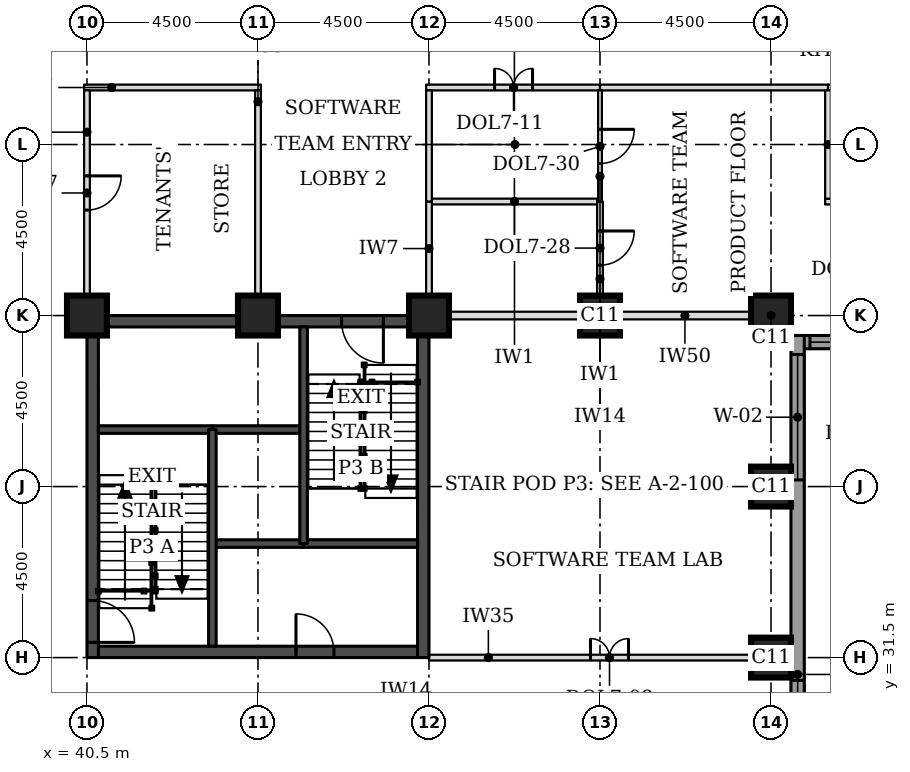
"""IFC4 building model, lengths in metres.
Left out: names, types, materials, properties, quantities, classifications, styles, units other than length and angle.
Written with IfcOpenShell. Run it as: python <this file> out.ifc"""

import sys

from ifc_helpers import new_model, si_unit, direction, frame, frame_2d, origin, origin_2d, place, context, subcontext, project, spatial, rectangle, extrude, element, fill, save


model = new_model("IFC4")
c1 = context("Model", 3, precision=1e-05, world=origin(), true_north=direction((0.0, 1.0)))
c2 = subcontext(c1, "Body", "Model", "MODEL_VIEW")
j1 = project(units=[si_unit("LENGTHUNIT", "METRE"), si_unit("PLANEANGLEUNIT", "RADIAN")], contexts=[c1])
p1 = place(None, origin())
s1 = spatial("IfcSite", under=j1, at=p1, CompositionType="ELEMENT")
p2 = place(p1, origin())
s2 = spatial("IfcBuilding", under=s1, at=p2, CompositionType="ELEMENT")
p3 = place(p2, frame((0.0, 0.0, 134.4)))
s3 = spatial("IfcBuildingStorey", under=s2, at=p3, CompositionType="ELEMENT", Elevation=134.4)
for number, where, z_axis, x_axis in (
    (1, (58.5, 31.5, 0.0), (0.0, 0.0, 1.0), (1.0, 0.0, 0.0)),
    (2, (58.5, 36.0, 0.0), (0.0, 0.0, 1.0), (1.0, 0.0, 0.0)),
    (3, (40.5, 40.5, 0.0), (0.0, 0.0, 1.0), (1.0, 0.0, 0.0)),
    (4, (45.0, 40.5, 0.0), (0.0, 0.0, 1.0), (1.0, 0.0, 0.0)),
    (5, (49.5, 40.5, 0.0), (0.0, 0.0, 1.0), (1.0, 0.0, 0.0)),
    (6, (54.0, 40.5, 0.0), (0.0, 0.0, 1.0), (1.0, 0.0, 0.0)),
    (7, (58.5, 40.5, 0.0), (0.0, 0.0, 1.0), (1.0, 0.0, 0.0)),
):
    element("IfcColumn", number, at=place(p3, frame(where, z_axis=z_axis, x_axis=x_axis)), inside=s3, PredefinedType="COLUMN", context=c2, shape_type="SweptSolid", body=[
        extrude(rectangle(XDim=1.05, YDim=1.05, at=origin_2d()), origin(), (0.0, 0.0, 1.0), 3.7),
    ])
p4 = place(p3, frame((40.8, 31.65, 0.0), z_axis=(0.0, 0.0, 1.0), x_axis=(1.0, 0.0, 0.0)))
e8 = element("IfcWall", 8, at=p4, inside=s3, PredefinedType="SHEAR", context=c2, shape_type="SweptSolid", body=[
    extrude(rectangle(XDim=8.4, YDim=0.3, at=frame_2d((4.2, 0.0))), origin(), (0.0, 0.0, 1.0), 3.7),
])
p5 = place(p4, frame((5.2, 0.0, 0.0)))
e9 = element("IfcOpeningElement", 9, at=p5, cuts=e8, PredefinedType="OPENING", context=c2, shape_type="SweptSolid", body=[
    extrude(rectangle(XDim=1.0, YDim=2.1, at=frame_2d((0.5, 1.05))), frame((0.0, 0.16, 0.0), z_axis=(0.0, -1.0, 0.0), x_axis=(1.0, 0.0, 0.0)), (0.0, 0.0, 1.0), 0.32),
])
p6 = place(p3, frame((40.8, 40.35, 0.0), z_axis=(0.0, 0.0, 1.0), x_axis=(1.0, 0.0, 0.0)))
e10 = element("IfcWall", 10, at=p6, inside=s3, PredefinedType="SHEAR", context=c2, shape_type="SweptSolid", body=[
    extrude(rectangle(XDim=8.4, YDim=0.3, at=frame_2d((4.2, 0.0))), origin(), (0.0, 0.0, 1.0), 3.7),
])
p7 = place(p6, frame((6.4, 0.0, 0.0)))
e11 = element("IfcOpeningElement", 11, at=p7, cuts=e10, PredefinedType="OPENING", context=c2, shape_type="SweptSolid", body=[
    extrude(rectangle(XDim=1.1, YDim=2.1, at=frame_2d((0.55, 1.05))), frame((0.0, 0.16, 0.0), z_axis=(0.0, -1.0, 0.0), x_axis=(1.0, 0.0, 0.0)), (0.0, 0.0, 1.0), 0.32),
])
p8 = place(p3, frame((40.65, 31.5, 0.0), z_axis=(0.0, 0.0, 1.0), x_axis=(0.0, 1.0, 0.0)))
e12 = element("IfcWall", 12, at=p8, inside=s3, PredefinedType="SHEAR", context=c2, shape_type="SweptSolid", body=[
    extrude(rectangle(XDim=9.0, YDim=0.3, at=frame_2d((4.5, 0.0))), origin(), (0.0, 0.0, 1.0), 3.7),
])
p9 = place(p8, frame((0.4, 0.0, 0.0)))
e13 = element("IfcOpeningElement", 13, at=p9, cuts=e12, PredefinedType="OPENING", context=c2, shape_type="SweptSolid", body=[
    extrude(rectangle(XDim=1.1, YDim=2.1, at=frame_2d((0.55, 1.05))), frame((0.0, 0.16, 0.0), z_axis=(0.0, -1.0, 0.0), x_axis=(1.0, 0.0, 0.0)), (0.0, 0.0, 1.0), 0.32),
])
p10 = place(p3, frame((49.35, 31.5, 0.0), z_axis=(0.0, 0.0, 1.0), x_axis=(0.0, 1.0, 0.0)))
e14 = element("IfcWall", 14, at=p10, inside=s3, PredefinedType="SHEAR", context=c2, shape_type="SweptSolid", body=[
    extrude(rectangle(XDim=9.0, YDim=0.3, at=frame_2d((4.5, 0.0))), origin(), (0.0, 0.0, 1.0), 3.7),
])
p11 = place(p3, frame((59.025, 39.8, 0.0), z_axis=(0.0, 0.0, 1.0), x_axis=(1.0, 0.0, 0.0)))
e15 = element("IfcWall", 15, at=p11, inside=s3, PredefinedType="STANDARD", context=c2, shape_type="SweptSolid", body=[
    extrude(rectangle(XDim=13.337, YDim=0.35, at=frame_2d((6.669, 0.0))), origin(), (0.0, 0.0, 1.0), 3.525),
])
p12 = place(p11, frame((0.5, 0.0, 0.9)))
e16 = element("IfcOpeningElement", 16, at=p12, cuts=e15, PredefinedType="OPENING", context=c2, shape_type="SweptSolid", body=[
    extrude(rectangle(XDim=3.3, YDim=1.9, at=frame_2d((1.65, 0.95))), frame((0.0, 0.185, 0.0), z_axis=(0.0, -1.0, 0.0), x_axis=(1.0, 0.0, 0.0)), (0.0, 0.0, 1.0), 0.37),
])
p13 = place(p3, frame((59.2, 22.138, 0.0), z_axis=(0.0, 0.0, 1.0), x_axis=(0.0, 1.0, 0.0)))
e17 = element("IfcWall", 17, at=p13, inside=s3, PredefinedType="STANDARD", context=c2, shape_type="SweptSolid", body=[
    extrude(rectangle(XDim=17.837, YDim=0.35, at=frame_2d((8.919, 0.0))), origin(), (0.0, 0.0, 1.0), 3.525),
])
p14 = place(p13, frame((5.462, 0.0, 0.9)))
e18 = element("IfcOpeningElement", 18, at=p14, cuts=e17, PredefinedType="OPENING", context=c2, shape_type="SweptSolid", body=[
    extrude(rectangle(XDim=3.3, YDim=1.9, at=frame_2d((1.65, 0.95))), frame((0.0, 0.185, 0.0), z_axis=(0.0, -1.0, 0.0), x_axis=(1.0, 0.0, 0.0)), (0.0, 0.0, 1.0), 0.37),
])
p15 = place(p13, frame((14.037, 0.0, 0.9)))
e19 = element("IfcOpeningElement", 19, at=p15, cuts=e17, PredefinedType="OPENING", context=c2, shape_type="SweptSolid", body=[
    extrude(rectangle(XDim=3.3, YDim=1.9, at=frame_2d((1.65, 0.95))), frame((0.0, 0.185, 0.0), z_axis=(0.0, -1.0, 0.0), x_axis=(1.0, 0.0, 0.0)), (0.0, 0.0, 1.0), 0.37),
])
p16 = place(p3, frame((49.5, 31.5, 0.0), z_axis=(0.0, 0.0, 1.0), x_axis=(1.0, 0.0, 0.0)))
e20 = element("IfcWall", 20, at=p16, inside=s3, PredefinedType="PARTITIONING", context=c2, shape_type="SweptSolid", body=[
    extrude(rectangle(XDim=9.525, YDim=0.15, at=frame_2d((4.762, 0.0))), origin(), (0.0, 0.0, 1.0), 2.55),
])
p17 = place(p16, frame((4.25, 0.0, 0.0)))
e21 = element("IfcOpeningElement", 21, at=p17, cuts=e20, PredefinedType="OPENING", context=c2, shape_type="SweptSolid", body=[
    extrude(rectangle(XDim=1.0, YDim=2.1, at=frame_2d((0.5, 1.05))), frame((0.0, 0.085, 0.0), z_axis=(0.0, -1.0, 0.0), x_axis=(1.0, 0.0, 0.0)), (0.0, 0.0, 1.0), 0.17),
])
p18 = place(p3, frame((50.015, 40.5, 0.0), z_axis=(0.0, 0.0, 1.0), x_axis=(1.0, 0.0, 0.0)))
e22 = element("IfcWall", 22, at=p18, inside=s3, PredefinedType="PARTITIONING", context=c2, shape_type="SweptSolid", body=[
    extrude(rectangle(XDim=3.46, YDim=0.2, at=frame_2d((1.73, 0.0))), origin(), (0.0, 0.0, 1.0), 2.8),
])
p19 = place(p3, frame((54.495, 40.5, 0.0), z_axis=(0.0, 0.0, 1.0), x_axis=(1.0, 0.0, 0.0)))
e23 = element("IfcWall", 23, at=p19, inside=s3, PredefinedType="PARTITIONING", context=c2, shape_type="SweptSolid", body=[
    extrude(rectangle(XDim=3.48, YDim=0.2, at=frame_2d((1.74, 0.0))), origin(), (0.0, 0.0, 1.0), 2.8),
])
p20 = place(p3, frame((49.575, 43.5, 0.0), z_axis=(0.0, 0.0, 1.0), x_axis=(1.0, 0.0, 0.0)))
e24 = element("IfcWall", 24, at=p20, inside=s3, PredefinedType="PARTITIONING", context=c2, shape_type="SweptSolid", body=[
    extrude(rectangle(XDim=4.35, YDim=0.15, at=frame_2d((2.175, 0.0))), origin(), (0.0, 0.0, 1.0), 3.55),
])
p21 = place(p3, frame((59.925, 43.5, 0.0), z_axis=(0.0, 0.0, 1.0), x_axis=(1.0, 0.0, 0.0)))
e25 = element("IfcWall", 25, at=p21, inside=s3, PredefinedType="PARTITIONING", context=c2, shape_type="SweptSolid", body=[
    extrude(rectangle(XDim=2.975, YDim=0.15, at=frame_2d((1.487, 0.0))), origin(), (0.0, 0.0, 1.0), 3.55),
])
p22 = place(p21, frame((1.05, 0.0, 0.0)))
e26 = element("IfcOpeningElement", 26, at=p22, cuts=e25, PredefinedType="OPENING", context=c2, shape_type="SweptSolid", body=[
    extrude(rectangle(XDim=0.9, YDim=2.1, at=frame_2d((0.45, 1.05))), frame((0.0, 0.085, 0.0), z_axis=(0.0, -1.0, 0.0), x_axis=(1.0, 0.0, 0.0)), (0.0, 0.0, 1.0), 0.17),
])
p23 = place(p3, frame((40.425, 46.5, 0.0), z_axis=(0.0, 0.0, 1.0), x_axis=(1.0, 0.0, 0.0)))
e27 = element("IfcWall", 27, at=p23, inside=s3, PredefinedType="PARTITIONING", context=c2, shape_type="SweptSolid", body=[
    extrude(rectangle(XDim=4.65, YDim=0.15, at=frame_2d((2.325, 0.0))), origin(), (0.0, 0.0, 1.0), 3.55),
])
p24 = place(p3, frame((49.425, 46.5, 0.0), z_axis=(0.0, 0.0, 1.0), x_axis=(1.0, 0.0, 0.0)))
e28 = element("IfcWall", 28, at=p24, inside=s3, PredefinedType="PARTITIONING", context=c2, shape_type="SweptSolid", body=[
    extrude(rectangle(XDim=4.575, YDim=0.15, at=frame_2d((2.288, 0.0))), origin(), (0.0, 0.0, 1.0), 3.55),
])
p25 = place(p24, frame((1.8, 0.0, 0.0)))
e29 = element("IfcOpeningElement", 29, at=p25, cuts=e28, PredefinedType="OPENING", context=c2, shape_type="SweptSolid", body=[
    extrude(rectangle(XDim=1.0, YDim=2.1, at=frame_2d((0.5, 1.05))), frame((0.0, 0.085, 0.0), z_axis=(0.0, -1.0, 0.0), x_axis=(1.0, 0.0, 0.0)), (0.0, 0.0, 1.0), 0.17),
])
p26 = place(p3, frame((54.0, 46.5, 0.0), z_axis=(0.0, 0.0, 1.0), x_axis=(1.0, 0.0, 0.0)))
e30 = element("IfcWall", 30, at=p26, inside=s3, PredefinedType="PARTITIONING", context=c2, shape_type="SweptSolid", body=[
    extrude(rectangle(XDim=6.0, YDim=0.15, at=frame_2d((3.0, 0.0))), origin(), (0.0, 0.0, 1.0), 3.55),
])
p27 = place(p3, frame((60.0, 46.5, 0.0), z_axis=(0.0, 0.0, 1.0), x_axis=(1.0, 0.0, 0.0)))
e31 = element("IfcWall", 31, at=p27, inside=s3, PredefinedType="PARTITIONING", context=c2, shape_type="SweptSolid", body=[
    extrude(rectangle(XDim=3.0, YDim=0.15, at=frame_2d((1.5, 0.0))), origin(), (0.0, 0.0, 1.0), 3.55),
])
p28 = place(p3, frame((40.5, 41.025, 0.0), z_axis=(0.0, 0.0, 1.0), x_axis=(0.0, 1.0, 0.0)))
e32 = element("IfcWall", 32, at=p28, inside=s3, PredefinedType="PARTITIONING", context=c2, shape_type="SweptSolid", body=[
    extrude(rectangle(XDim=5.4, YDim=0.15, at=frame_2d((2.7, 0.0))), origin(), (0.0, 0.0, 1.0), 3.55),
])
p29 = place(p28, frame((2.25, 0.0, 0.0)))
e33 = element("IfcOpeningElement", 33, at=p29, cuts=e32, PredefinedType="OPENING", context=c2, shape_type="SweptSolid", body=[
    extrude(rectangle(XDim=0.9, YDim=2.1, at=frame_2d((0.45, 1.05))), frame((0.0, 0.085, 0.0), z_axis=(0.0, -1.0, 0.0), x_axis=(1.0, 0.0, 0.0)), (0.0, 0.0, 1.0), 0.17),
])
p30 = place(p3, frame((45.0, 41.025, 0.0), z_axis=(0.0, 0.0, 1.0), x_axis=(0.0, 1.0, 0.0)))
e34 = element("IfcWall", 34, at=p30, inside=s3, PredefinedType="PARTITIONING", context=c2, shape_type="SweptSolid", body=[
    extrude(rectangle(XDim=5.4, YDim=0.15, at=frame_2d((2.7, 0.0))), origin(), (0.0, 0.0, 1.0), 2.938),
])
p31 = place(p3, frame((49.5, 41.025, 0.0), z_axis=(0.0, 0.0, 1.0), x_axis=(0.0, 1.0, 0.0)))
e35 = element("IfcWall", 35, at=p31, inside=s3, PredefinedType="PARTITIONING", context=c2, shape_type="SweptSolid", body=[
    extrude(rectangle(XDim=2.475, YDim=0.15, at=frame_2d((1.238, 0.0))), origin(), (0.0, 0.0, 1.0), 3.55),
])
p32 = place(p3, frame((54.0, 41.025, 0.0), z_axis=(0.0, 0.0, 1.0), x_axis=(0.0, 1.0, 0.0)))
e36 = element("IfcWall", 36, at=p32, inside=s3, PredefinedType="PARTITIONING", context=c2, shape_type="SweptSolid", body=[
    extrude(rectangle(XDim=2.475, YDim=0.15, at=frame_2d((1.238, 0.0))), origin(), (0.0, 0.0, 1.0), 3.55),
])
p33 = place(p32, frame((0.8, 0.0, 0.0)))
e37 = element("IfcOpeningElement", 37, at=p33, cuts=e36, PredefinedType="OPENING", context=c2, shape_type="SweptSolid", body=[
    extrude(rectangle(XDim=0.9, YDim=2.1, at=frame_2d((0.45, 1.05))), frame((0.0, 0.085, 0.0), z_axis=(0.0, -1.0, 0.0), x_axis=(1.0, 0.0, 0.0)), (0.0, 0.0, 1.0), 0.17),
])
p34 = place(p3, frame((49.5, 43.5, 0.0), z_axis=(0.0, 0.0, 1.0), x_axis=(0.0, 1.0, 0.0)))
e38 = element("IfcWall", 38, at=p34, inside=s3, PredefinedType="PARTITIONING", context=c2, shape_type="SweptSolid", body=[
    extrude(rectangle(XDim=2.925, YDim=0.15, at=frame_2d((1.462, 0.0))), origin(), (0.0, 0.0, 1.0), 3.55),
])
p35 = place(p3, frame((54.0, 43.5, 0.0), z_axis=(0.0, 0.0, 1.0), x_axis=(0.0, 1.0, 0.0)))
e39 = element("IfcWall", 39, at=p35, inside=s3, PredefinedType="PARTITIONING", context=c2, shape_type="SweptSolid", body=[
    extrude(rectangle(XDim=2.925, YDim=0.1, at=frame_2d((1.462, 0.0))), origin(), (0.0, 0.0, 1.0), 3.55),
])
p36 = place(p35, frame((1.0, 0.0, 0.0)))
e40 = element("IfcOpeningElement", 40, at=p36, cuts=e39, PredefinedType="OPENING", context=c2, shape_type="SweptSolid", body=[
    extrude(rectangle(XDim=0.9, YDim=2.1, at=frame_2d((0.45, 1.05))), frame((0.0, 0.06, 0.0), z_axis=(0.0, -1.0, 0.0), x_axis=(1.0, 0.0, 0.0)), (0.0, 0.0, 1.0), 0.12),
])
p37 = place(p3, frame((60.0, 43.575, 0.0), z_axis=(0.0, 0.0, 1.0), x_axis=(0.0, 1.0, 0.0)))
e41 = element("IfcWall", 41, at=p37, inside=s3, PredefinedType="PARTITIONING", context=c2, shape_type="SweptSolid", body=[
    extrude(rectangle(XDim=2.85, YDim=0.15, at=frame_2d((1.425, 0.0))), origin(), (0.0, 0.0, 1.0), 3.55),
])
p38 = place(p3, frame((43.8, 34.5, 0.0), z_axis=(0.0, 0.0, 1.0), x_axis=(1.0, 0.0, 0.0)))
e42 = element("IfcWall", 42, at=p38, inside=s3, PredefinedType="SOLIDWALL", context=c2, shape_type="SweptSolid", body=[
    extrude(rectangle(XDim=2.4, YDim=0.2, at=frame_2d((1.2, 0.0))), origin(), (0.0, 0.0, 1.0), 3.55),
])
p39 = place(p3, frame((46.2, 34.5, 0.0), z_axis=(0.0, 0.0, 1.0), x_axis=(1.0, 0.0, 0.0)))
e43 = element("IfcWall", 43, at=p39, inside=s3, PredefinedType="SOLIDWALL", context=c2, shape_type="SweptSolid", body=[
    extrude(rectangle(XDim=3.0, YDim=0.2, at=frame_2d((1.5, 0.0))), origin(), (0.0, 0.0, 1.0), 3.55),
])
p40 = place(p3, frame((43.8, 37.5, 0.0), z_axis=(0.0, 0.0, 1.0), x_axis=(1.0, 0.0, 0.0)))
e44 = element("IfcWall", 44, at=p40, inside=s3, PredefinedType="SOLIDWALL", context=c2, shape_type="SweptSolid", body=[
    extrude(rectangle(XDim=2.4, YDim=0.2, at=frame_2d((1.2, 0.0))), origin(), (0.0, 0.0, 1.0), 3.7),
])
p41 = place(p3, frame((40.8, 37.5, 0.0), z_axis=(0.0, 0.0, 1.0), x_axis=(1.0, 0.0, 0.0)))
e45 = element("IfcWall", 45, at=p41, inside=s3, PredefinedType="SOLIDWALL", context=c2, shape_type="SweptSolid", body=[
    extrude(rectangle(XDim=3.0, YDim=0.2, at=frame_2d((1.5, 0.0))), origin(), (0.0, 0.0, 1.0), 3.55),
])
for number, where, z_axis, x_axis in (
    (46, (43.8, 31.8, 0.0), (0.0, 0.0, 1.0), (0.0, 1.0, 0.0)),
    (47, (46.2, 34.5, 0.0), (0.0, 0.0, 1.0), (0.0, 1.0, 0.0)),
):
    element("IfcWall", number, at=place(p3, frame(where, z_axis=z_axis, x_axis=x_axis)), inside=s3, PredefinedType="SOLIDWALL", context=c2, shape_type="SweptSolid", body=[
        extrude(rectangle(XDim=5.7, YDim=0.2, at=frame_2d((2.85, 0.0))), origin(), (0.0, 0.0, 1.0), 3.55),
    ])
p42 = place(p12, origin())
e48 = element("IfcWindow", 48, at=p42, inside=s3, PartitioningType="SINGLE_PANEL", PredefinedType="WINDOW", context=c2, shape_type="SweptSolid", body=[
    extrude(rectangle(XDim=3.3, YDim=1.9, at=frame_2d((1.65, 0.95))), frame((0.0, 0.085, 0.0), z_axis=(0.0, -1.0, 0.0), x_axis=(1.0, 0.0, 0.0)), (0.0, 0.0, 1.0), 0.06),
])
fill(e16, e48)
p43 = place(p14, origin())
e49 = element("IfcWindow", 49, at=p43, inside=s3, PartitioningType="SINGLE_PANEL", PredefinedType="WINDOW", context=c2, shape_type="SweptSolid", body=[
    extrude(rectangle(XDim=3.3, YDim=1.9, at=frame_2d((1.65, 0.95))), frame((0.0, 0.085, 0.0), z_axis=(0.0, -1.0, 0.0), x_axis=(1.0, 0.0, 0.0)), (0.0, 0.0, 1.0), 0.06),
])
fill(e18, e49)
p44 = place(p15, origin())
e50 = element("IfcWindow", 50, at=p44, inside=s3, PartitioningType="SINGLE_PANEL", PredefinedType="WINDOW", context=c2, shape_type="SweptSolid", body=[
    extrude(rectangle(XDim=3.3, YDim=1.9, at=frame_2d((1.65, 0.95))), frame((0.0, 0.085, 0.0), z_axis=(0.0, -1.0, 0.0), x_axis=(1.0, 0.0, 0.0)), (0.0, 0.0, 1.0), 0.06),
])
fill(e19, e50)
p45 = place(p29, frame((0.9, 0.0, 0.0), z_axis=(0.0, 0.0, 1.0), x_axis=(-1.0, 0.0, 0.0)))
e51 = element("IfcDoor", 51, at=p45, inside=s3, OperationType="SINGLE_SWING_LEFT", PredefinedType="DOOR", context=c2, shape_type="SweptSolid", body=[
    extrude(rectangle(XDim=0.9, YDim=2.1, at=frame_2d((0.45, 1.05))), frame((0.0, 0.025, 0.0), z_axis=(0.0, -1.0, 0.0), x_axis=(1.0, 0.0, 0.0)), (0.0, 0.0, 1.0), 0.05),
])
fill(e33, e51)
p46 = place(p17, origin())
e52 = element("IfcDoor", 52, at=p46, inside=s3, OperationType="DOUBLE_DOOR_SINGLE_SWING", PredefinedType="DOOR", context=c2, shape_type="SweptSolid", body=[
    extrude(rectangle(XDim=1.0, YDim=2.1, at=frame_2d((0.5, 1.05))), frame((0.0, 0.025, 0.0), z_axis=(0.0, -1.0, 0.0), x_axis=(1.0, 0.0, 0.0)), (0.0, 0.0, 1.0), 0.05),
])
fill(e21, e52)
p47 = place(p25, origin())
e53 = element("IfcDoor", 53, at=p47, inside=s3, OperationType="DOUBLE_DOOR_SINGLE_SWING", PredefinedType="DOOR", context=c2, shape_type="SweptSolid", body=[
    extrude(rectangle(XDim=1.0, YDim=2.1, at=frame_2d((0.5, 1.05))), frame((0.0, 0.025, 0.0), z_axis=(0.0, -1.0, 0.0), x_axis=(1.0, 0.0, 0.0)), (0.0, 0.0, 1.0), 0.05),
])
fill(e29, e53)
p48 = place(p36, frame((0.9, 0.0, 0.0), z_axis=(0.0, 0.0, 1.0), x_axis=(-1.0, 0.0, 0.0)))
e54 = element("IfcDoor", 54, at=p48, inside=s3, OperationType="SINGLE_SWING_LEFT", PredefinedType="DOOR", context=c2, shape_type="SweptSolid", body=[
    extrude(rectangle(XDim=0.9, YDim=2.1, at=frame_2d((0.45, 1.05))), frame((0.0, 0.025, 0.0), z_axis=(0.0, -1.0, 0.0), x_axis=(1.0, 0.0, 0.0)), (0.0, 0.0, 1.0), 0.05),
])
fill(e40, e54)
p49 = place(p33, frame((0.9, 0.0, 0.0), z_axis=(0.0, 0.0, 1.0), x_axis=(-1.0, 0.0, 0.0)))
e55 = element("IfcDoor", 55, at=p49, inside=s3, OperationType="SINGLE_SWING_LEFT", PredefinedType="DOOR", context=c2, shape_type="SweptSolid", body=[
    extrude(rectangle(XDim=0.9, YDim=2.1, at=frame_2d((0.45, 1.05))), frame((0.0, 0.025, 0.0), z_axis=(0.0, -1.0, 0.0), x_axis=(1.0, 0.0, 0.0)), (0.0, 0.0, 1.0), 0.05),
])
fill(e37, e55)
p50 = place(p9, frame((1.1, 0.0, 0.0), z_axis=(0.0, 0.0, 1.0), x_axis=(-1.0, 0.0, 0.0)))
e56 = element("IfcDoor", 56, at=p50, inside=s3, OperationType="SINGLE_SWING_RIGHT", PredefinedType="DOOR", context=c2, shape_type="SweptSolid", body=[
    extrude(rectangle(XDim=1.1, YDim=2.1, at=frame_2d((0.55, 1.05))), frame((0.0, 0.025, 0.0), z_axis=(0.0, -1.0, 0.0), x_axis=(1.0, 0.0, 0.0)), (0.0, 0.0, 1.0), 0.05),
])
fill(e13, e56)
p51 = place(p7, frame((1.1, 0.0, 0.0), z_axis=(0.0, 0.0, 1.0), x_axis=(-1.0, 0.0, 0.0)))
e57 = element("IfcDoor", 57, at=p51, inside=s3, OperationType="SINGLE_SWING_LEFT", PredefinedType="DOOR", context=c2, shape_type="SweptSolid", body=[
    extrude(rectangle(XDim=1.1, YDim=2.1, at=frame_2d((0.55, 1.05))), frame((0.0, 0.025, 0.0), z_axis=(0.0, -1.0, 0.0), x_axis=(1.0, 0.0, 0.0)), (0.0, 0.0, 1.0), 0.05),
])
fill(e11, e57)
p52 = place(p5, origin())
e58 = element("IfcDoor", 58, at=p52, inside=s3, OperationType="SINGLE_SWING_LEFT", PredefinedType="DOOR", context=c2, shape_type="SweptSolid", body=[
    extrude(rectangle(XDim=1.0, YDim=2.1, at=frame_2d((0.5, 1.05))), frame((0.0, 0.025, 0.0), z_axis=(0.0, -1.0, 0.0), x_axis=(1.0, 0.0, 0.0)), (0.0, 0.0, 1.0), 0.05),
])
fill(e9, e58)
save(model, sys.argv[1])
